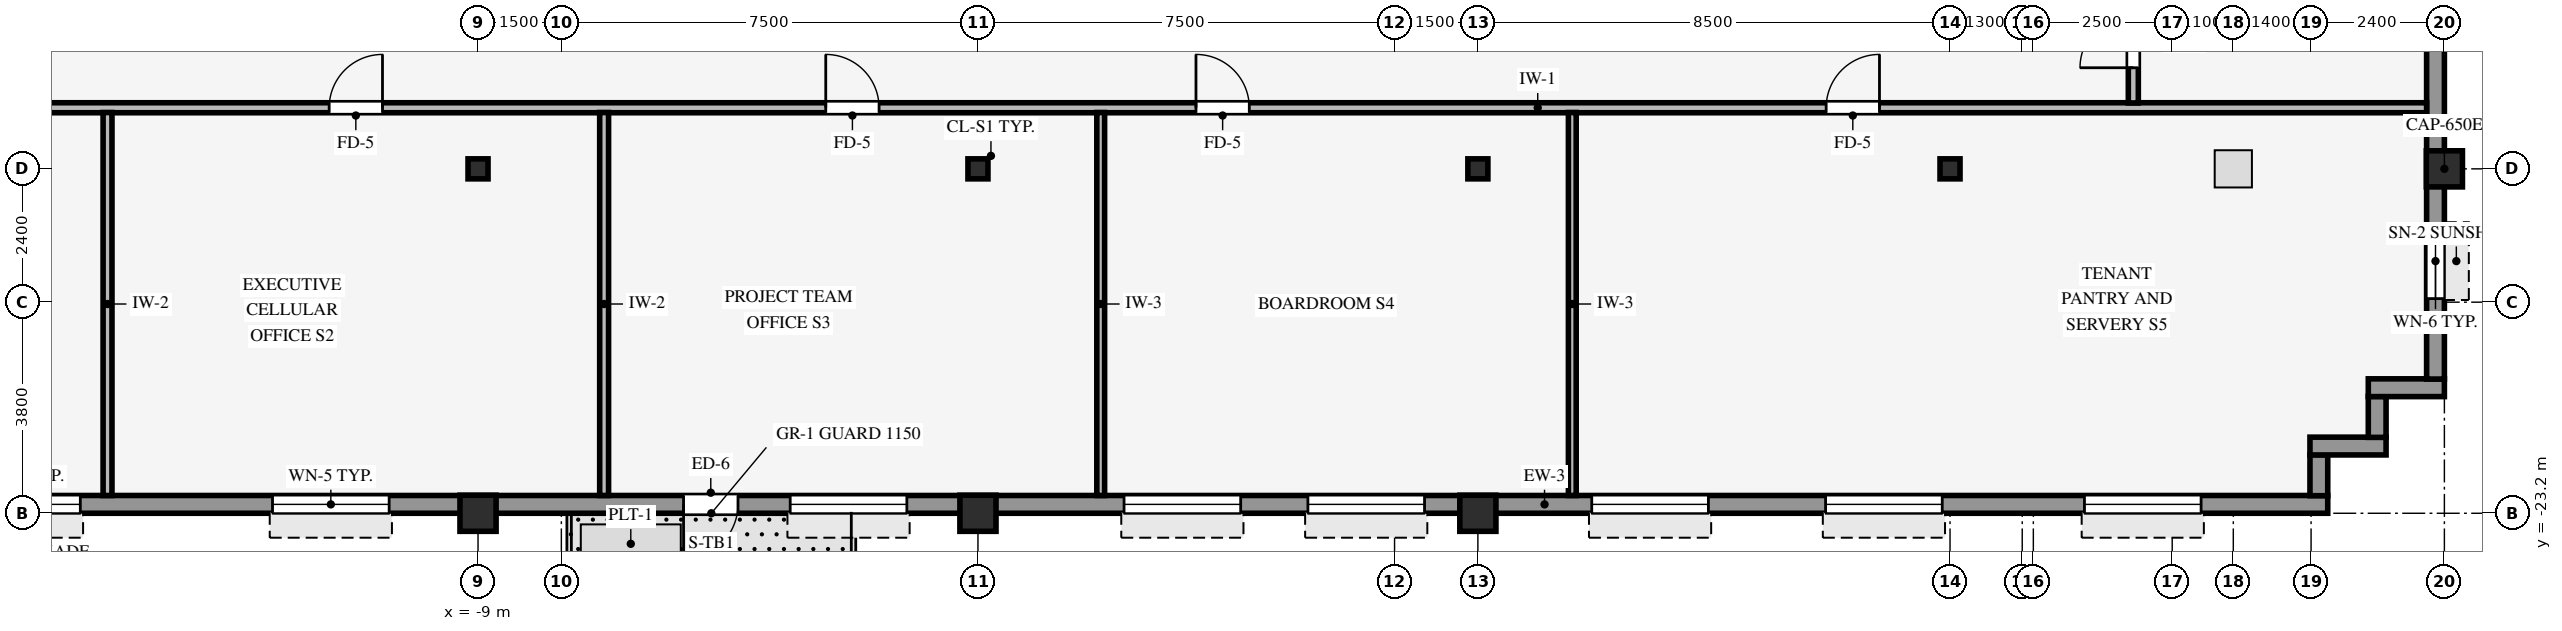
"""IFC4 building model, lengths in metres.
Left out: names, types, materials, properties, quantities, classifications, styles, units other than length and angle.
Written with IfcOpenShell. Run it as: python <this file> out.ifc"""

import sys

from ifc_helpers import new_model, si_unit, direction, frame, frame_2d, origin, origin_2d, place, context, subcontext, project, spatial, rectangle, hollow_rectangle, i_section, extrude, source, transform, mapped, element, fill, save


model = new_model("IFC4")
c1 = context("Model", 3, precision=1e-05, world=origin(), true_north=direction((0.0, 1.0)))
c2 = subcontext(c1, "Body", "Model", "MODEL_VIEW")
j1 = project(units=[si_unit("LENGTHUNIT", "METRE"), si_unit("PLANEANGLEUNIT", "RADIAN")], contexts=[c1])
p1 = place(None, origin())
s1 = spatial("IfcSite", under=j1, at=p1, CompositionType="ELEMENT")
p2 = place(p1, origin())
s2 = spatial("IfcBuilding", under=s1, at=p2, CompositionType="ELEMENT")
p3 = place(p2, frame((0.0, 0.0, 164.0)))
s3 = spatial("IfcBuildingStorey", under=s2, at=p3, CompositionType="ELEMENT", Elevation=164.0)
for number, where, z_axis, x_axis in (
    (1, (26.4, -17.0, 0.0), (0.0, 0.0, 1.0), (1.0, 0.0, 0.0)),
    (2, (-9.0, -23.2, 0.0), (0.0, 0.0, 1.0), (1.0, 0.0, 0.0)),
    (3, (0.0, -23.2, 0.0), (0.0, 0.0, 1.0), (1.0, 0.0, 0.0)),
    (4, (9.0, -23.2, 0.0), (0.0, 0.0, 1.0), (1.0, 0.0, 0.0)),
):
    element("IfcColumn", number, at=place(p3, frame(where, z_axis=z_axis, x_axis=x_axis)), inside=s3, PredefinedType="COLUMN", context=c2, shape_type="SweptSolid", body=[
        extrude(hollow_rectangle(XDim=0.65, YDim=0.65, WallThickness=0.04, InnerFilletRadius=0.04, OuterFilletRadius=0.08, at=origin_2d()), origin(), (0.0, 0.0, 1.0), 3.25),
    ])
for number, where, z_axis, x_axis in (
    (5, (0.0, -17.0, 0.0), (0.0, 0.0, 1.0), (1.0, 0.0, 0.0)),
    (6, (-9.0, -17.0, 0.0), (0.0, 0.0, 1.0), (1.0, 0.0, 0.0)),
    (7, (9.0, -17.0, 0.0), (0.0, 0.0, 1.0), (1.0, 0.0, 0.0)),
    (8, (17.5, -17.0, 0.0), (0.0, 0.0, 1.0), (1.0, 0.0, 0.0)),
):
    element("IfcColumn", number, at=place(p3, frame(where, z_axis=z_axis, x_axis=x_axis)), inside=s3, PredefinedType="COLUMN", context=c2, shape_type="SweptSolid", body=[
        extrude(i_section(OverallWidth=0.36, OverallDepth=0.36, WebThickness=0.021, FlangeThickness=0.021, FilletRadius=0.018, at=origin_2d()), origin(), (0.0, 0.0, 1.0), 3.25),
    ])
p4 = place(p3, frame((-24.3, -23.04, 0.0), z_axis=(0.0, 0.0, 1.0), x_axis=(1.0, 0.0, 0.0)))
e9 = element("IfcWall", 9, at=p4, inside=s3, PredefinedType="STANDARD", context=c2, shape_type="SweptSolid", body=[
    extrude(rectangle(XDim=48.6, YDim=0.32, at=frame_2d((24.3, 0.0))), origin(), (0.0, 0.0, 1.0), 2.585),
])
p5 = place(p4, frame((19.98, 0.0, 0.0), z_axis=(0.0, 0.0, 1.0), x_axis=(-1.0, 0.0, 0.0)))
e10 = element("IfcOpeningElement", 10, at=p5, cuts=e9, PredefinedType="OPENING", context=c2, shape_type="SweptSolid", body=[
    extrude(rectangle(XDim=0.98, YDim=2.15, at=frame_2d((0.49, 1.075))), frame((0.0, 0.17, 0.0), z_axis=(0.0, -1.0, 0.0), x_axis=(1.0, 0.0, 0.0)), (0.0, 0.0, 1.0), 0.34),
])
p6 = place(p4, frame((2.28, 0.0, 0.8)))
e11 = element("IfcOpeningElement", 11, at=p6, cuts=e9, PredefinedType="OPENING", context=c2, shape_type="SweptSolid", body=[
    extrude(rectangle(XDim=2.1, YDim=1.56, at=frame_2d((1.05, 0.78))), frame((0.0, 0.17, 0.0), z_axis=(0.0, -1.0, 0.0), x_axis=(1.0, 0.0, 0.0)), (0.0, 0.0, 1.0), 0.34),
])
p7 = place(p4, frame((6.04, 0.0, 0.8)))
e12 = element("IfcOpeningElement", 12, at=p7, cuts=e9, PredefinedType="OPENING", context=c2, shape_type="SweptSolid", body=[
    extrude(rectangle(XDim=2.1, YDim=1.56, at=frame_2d((1.05, 0.78))), frame((0.0, 0.17, 0.0), z_axis=(0.0, -1.0, 0.0), x_axis=(1.0, 0.0, 0.0)), (0.0, 0.0, 1.0), 0.34),
])
p8 = place(p4, frame((11.6, 0.0, 0.8)))
e13 = element("IfcOpeningElement", 13, at=p8, cuts=e9, PredefinedType="OPENING", context=c2, shape_type="SweptSolid", body=[
    extrude(rectangle(XDim=2.1, YDim=1.56, at=frame_2d((1.05, 0.78))), frame((0.0, 0.17, 0.0), z_axis=(0.0, -1.0, 0.0), x_axis=(1.0, 0.0, 0.0)), (0.0, 0.0, 1.0), 0.34),
])
p9 = place(p4, frame((20.92, 0.0, 0.8)))
e14 = element("IfcOpeningElement", 14, at=p9, cuts=e9, PredefinedType="OPENING", context=c2, shape_type="SweptSolid", body=[
    extrude(rectangle(XDim=2.1, YDim=1.56, at=frame_2d((1.05, 0.78))), frame((0.0, 0.17, 0.0), z_axis=(0.0, -1.0, 0.0), x_axis=(1.0, 0.0, 0.0)), (0.0, 0.0, 1.0), 0.34),
])
p10 = place(p4, frame((26.93, 0.0, 0.8)))
e15 = element("IfcOpeningElement", 15, at=p10, cuts=e9, PredefinedType="OPENING", context=c2, shape_type="SweptSolid", body=[
    extrude(rectangle(XDim=2.1, YDim=1.56, at=frame_2d((1.05, 0.78))), frame((0.0, 0.17, 0.0), z_axis=(0.0, -1.0, 0.0), x_axis=(1.0, 0.0, 0.0)), (0.0, 0.0, 1.0), 0.34),
])
p11 = place(p4, frame((30.24, 0.0, 0.8)))
e16 = element("IfcOpeningElement", 16, at=p11, cuts=e9, PredefinedType="OPENING", context=c2, shape_type="SweptSolid", body=[
    extrude(rectangle(XDim=2.1, YDim=1.56, at=frame_2d((1.05, 0.78))), frame((0.0, 0.17, 0.0), z_axis=(0.0, -1.0, 0.0), x_axis=(1.0, 0.0, 0.0)), (0.0, 0.0, 1.0), 0.34),
])
p12 = place(p4, frame((35.35, 0.0, 0.8)))
e17 = element("IfcOpeningElement", 17, at=p12, cuts=e9, PredefinedType="OPENING", context=c2, shape_type="SweptSolid", body=[
    extrude(rectangle(XDim=2.1, YDim=1.56, at=frame_2d((1.05, 0.78))), frame((0.0, 0.17, 0.0), z_axis=(0.0, -1.0, 0.0), x_axis=(1.0, 0.0, 0.0)), (0.0, 0.0, 1.0), 0.34),
])
p13 = place(p4, frame((39.56, 0.0, 0.8)))
e18 = element("IfcOpeningElement", 18, at=p13, cuts=e9, PredefinedType="OPENING", context=c2, shape_type="SweptSolid", body=[
    extrude(rectangle(XDim=2.1, YDim=1.56, at=frame_2d((1.05, 0.78))), frame((0.0, 0.17, 0.0), z_axis=(0.0, -1.0, 0.0), x_axis=(1.0, 0.0, 0.0)), (0.0, 0.0, 1.0), 0.34),
])
p14 = place(p4, frame((44.22, 0.0, 0.8)))
e19 = element("IfcOpeningElement", 19, at=p14, cuts=e9, PredefinedType="OPENING", context=c2, shape_type="SweptSolid", body=[
    extrude(rectangle(XDim=2.1, YDim=1.56, at=frame_2d((1.05, 0.78))), frame((0.0, 0.17, 0.0), z_axis=(0.0, -1.0, 0.0), x_axis=(1.0, 0.0, 0.0)), (0.0, 0.0, 1.0), 0.34),
])
p15 = place(p3, frame((24.14, -22.884, 0.0), z_axis=(0.0, 0.0, 1.0), x_axis=(0.0, 1.0, 0.0)))
e20 = element("IfcWall", 20, at=p15, inside=s3, PredefinedType="STANDARD", context=c2, shape_type="SweptSolid", body=[
    extrude(rectangle(XDim=0.738, YDim=0.32, at=frame_2d((0.369, 0.0))), origin(), (0.0, 0.0, 1.0), 3.24),
])
p16 = place(p3, frame((23.98, -21.99, 0.0), z_axis=(0.0, 0.0, 1.0), x_axis=(1.0, 0.0, 0.0)))
e21 = element("IfcWall", 21, at=p16, inside=s3, PredefinedType="STANDARD", context=c2, shape_type="SweptSolid", body=[
    extrude(rectangle(XDim=1.37, YDim=0.32, at=frame_2d((0.685, 0.0))), origin(), (0.0, 0.0, 1.0), 3.24),
])
p17 = place(p3, frame((25.19, -21.834, 0.0), z_axis=(0.0, 0.0, 1.0), x_axis=(0.0, 1.0, 0.0)))
e22 = element("IfcWall", 22, at=p17, inside=s3, PredefinedType="STANDARD", context=c2, shape_type="SweptSolid", body=[
    extrude(rectangle(XDim=0.738, YDim=0.32, at=frame_2d((0.369, 0.0))), origin(), (0.0, 0.0, 1.0), 3.24),
])
p18 = place(p3, frame((25.03, -20.94, 0.0), z_axis=(0.0, 0.0, 1.0), x_axis=(1.0, 0.0, 0.0)))
e23 = element("IfcWall", 23, at=p18, inside=s3, PredefinedType="STANDARD", context=c2, shape_type="SweptSolid", body=[
    extrude(rectangle(XDim=1.37, YDim=0.32, at=frame_2d((0.685, 0.0))), origin(), (0.0, 0.0, 1.0), 3.24),
])
p19 = place(p3, frame((26.24, -20.784, 0.0), z_axis=(0.0, 0.0, 1.0), x_axis=(0.0, 1.0, 0.0)))
e24 = element("IfcWall", 24, at=p19, inside=s3, PredefinedType="STANDARD", context=c2, shape_type="SweptSolid", body=[
    extrude(rectangle(XDim=41.568, YDim=0.32, at=frame_2d((20.784, 0.0))), origin(), (0.0, 0.0, 1.0), 3.24),
])
p20 = place(p19, frame((1.448, 0.0, 0.8)))
e25 = element("IfcOpeningElement", 25, at=p20, cuts=e24, PredefinedType="OPENING", context=c2, shape_type="SweptSolid", body=[
    extrude(rectangle(XDim=1.35, YDim=1.56, at=frame_2d((0.675, 0.78))), frame((0.0, 0.17, 0.0), z_axis=(0.0, -1.0, 0.0), x_axis=(1.0, 0.0, 0.0)), (0.0, 0.0, 1.0), 0.34),
])
p21 = place(p19, frame((7.744, 0.0, 0.8)))
e26 = element("IfcOpeningElement", 26, at=p21, cuts=e24, PredefinedType="OPENING", context=c2, shape_type="SweptSolid", body=[
    extrude(rectangle(XDim=1.35, YDim=1.56, at=frame_2d((0.675, 0.78))), frame((0.0, 0.17, 0.0), z_axis=(0.0, -1.0, 0.0), x_axis=(1.0, 0.0, 0.0)), (0.0, 0.0, 1.0), 0.34),
])
p22 = place(p19, frame((12.69, 0.0, 0.8)))
e27 = element("IfcOpeningElement", 27, at=p22, cuts=e24, PredefinedType="OPENING", context=c2, shape_type="SweptSolid", body=[
    extrude(rectangle(XDim=1.35, YDim=1.56, at=frame_2d((0.675, 0.78))), frame((0.0, 0.17, 0.0), z_axis=(0.0, -1.0, 0.0), x_axis=(1.0, 0.0, 0.0)), (0.0, 0.0, 1.0), 0.34),
])
p23 = place(p19, frame((17.636, 0.0, 0.8)))
e28 = element("IfcOpeningElement", 28, at=p23, cuts=e24, PredefinedType="OPENING", context=c2, shape_type="SweptSolid", body=[
    extrude(rectangle(XDim=1.35, YDim=1.56, at=frame_2d((0.675, 0.78))), frame((0.0, 0.17, 0.0), z_axis=(0.0, -1.0, 0.0), x_axis=(1.0, 0.0, 0.0)), (0.0, 0.0, 1.0), 0.34),
])
p24 = place(p19, frame((22.582, 0.0, 0.8)))
e29 = element("IfcOpeningElement", 29, at=p24, cuts=e24, PredefinedType="OPENING", context=c2, shape_type="SweptSolid", body=[
    extrude(rectangle(XDim=1.35, YDim=1.56, at=frame_2d((0.675, 0.78))), frame((0.0, 0.17, 0.0), z_axis=(0.0, -1.0, 0.0), x_axis=(1.0, 0.0, 0.0)), (0.0, 0.0, 1.0), 0.34),
])
p25 = place(p19, frame((27.528, 0.0, 0.8)))
e30 = element("IfcOpeningElement", 30, at=p25, cuts=e24, PredefinedType="OPENING", context=c2, shape_type="SweptSolid", body=[
    extrude(rectangle(XDim=1.35, YDim=1.56, at=frame_2d((0.675, 0.78))), frame((0.0, 0.17, 0.0), z_axis=(0.0, -1.0, 0.0), x_axis=(1.0, 0.0, 0.0)), (0.0, 0.0, 1.0), 0.34),
])
p26 = place(p19, frame((32.474, 0.0, 0.8)))
e31 = element("IfcOpeningElement", 31, at=p26, cuts=e24, PredefinedType="OPENING", context=c2, shape_type="SweptSolid", body=[
    extrude(rectangle(XDim=1.35, YDim=1.56, at=frame_2d((0.675, 0.78))), frame((0.0, 0.17, 0.0), z_axis=(0.0, -1.0, 0.0), x_axis=(1.0, 0.0, 0.0)), (0.0, 0.0, 1.0), 0.34),
])
p27 = place(p19, frame((38.77, 0.0, 0.8)))
e32 = element("IfcOpeningElement", 32, at=p27, cuts=e24, PredefinedType="OPENING", context=c2, shape_type="SweptSolid", body=[
    extrude(rectangle(XDim=1.35, YDim=1.56, at=frame_2d((0.675, 0.78))), frame((0.0, 0.17, 0.0), z_axis=(0.0, -1.0, 0.0), x_axis=(1.0, 0.0, 0.0)), (0.0, 0.0, 1.0), 0.34),
])
p28 = place(p3, frame((-26.08, -15.9, 0.0), z_axis=(0.0, 0.0, 1.0), x_axis=(1.0, 0.0, 0.0)))
e33 = element("IfcWall", 33, at=p28, inside=s3, PredefinedType="PARTITIONING", context=c2, shape_type="SweptSolid", body=[
    extrude(rectangle(XDim=52.16, YDim=0.18, at=frame_2d((26.08, 0.0))), origin(), (0.0, 0.0, 1.0), 3.24),
])
p29 = place(p28, frame((41.35, 0.0, 0.0)))
e34 = element("IfcOpeningElement", 34, at=p29, cuts=e33, PredefinedType="OPENING", context=c2, shape_type="SweptSolid", body=[
    extrude(rectangle(XDim=0.96, YDim=2.1, at=frame_2d((0.48, 1.05))), frame((0.0, 0.1, 0.0), z_axis=(0.0, -1.0, 0.0), x_axis=(1.0, 0.0, 0.0)), (0.0, 0.0, 1.0), 0.2),
])
p30 = place(p28, frame((23.34, 0.0, 0.0)))
e35 = element("IfcOpeningElement", 35, at=p30, cuts=e33, PredefinedType="OPENING", context=c2, shape_type="SweptSolid", body=[
    extrude(rectangle(XDim=0.96, YDim=2.1, at=frame_2d((0.48, 1.05))), frame((0.0, 0.1, 0.0), z_axis=(0.0, -1.0, 0.0), x_axis=(1.0, 0.0, 0.0)), (0.0, 0.0, 1.0), 0.2),
])
p31 = place(p28, frame((14.4, 0.0, 0.0)))
e36 = element("IfcOpeningElement", 36, at=p31, cuts=e33, PredefinedType="OPENING", context=c2, shape_type="SweptSolid", body=[
    extrude(rectangle(XDim=0.96, YDim=2.1, at=frame_2d((0.48, 1.05))), frame((0.0, 0.1, 0.0), z_axis=(0.0, -1.0, 0.0), x_axis=(1.0, 0.0, 0.0)), (0.0, 0.0, 1.0), 0.2),
])
p32 = place(p28, frame((30.005, 0.0, 0.0)))
e37 = element("IfcOpeningElement", 37, at=p32, cuts=e33, PredefinedType="OPENING", context=c2, shape_type="SweptSolid", body=[
    extrude(rectangle(XDim=0.96, YDim=2.1, at=frame_2d((0.48, 1.05))), frame((0.0, 0.1, 0.0), z_axis=(0.0, -1.0, 0.0), x_axis=(1.0, 0.0, 0.0)), (0.0, 0.0, 1.0), 0.2),
])
p33 = place(p28, frame((6.65, 0.0, 0.0)))
e38 = element("IfcOpeningElement", 38, at=p33, cuts=e33, PredefinedType="OPENING", context=c2, shape_type="SweptSolid", body=[
    extrude(rectangle(XDim=0.96, YDim=2.1, at=frame_2d((0.48, 1.05))), frame((0.0, 0.1, 0.0), z_axis=(0.0, -1.0, 0.0), x_axis=(1.0, 0.0, 0.0)), (0.0, 0.0, 1.0), 0.2),
])
for number, where, z_axis, x_axis in (
    (39, (-15.67, -22.88, 0.0), (0.0, 0.0, 1.0), (0.0, 1.0, 0.0)),
    (40, (-6.73, -22.88, 0.0), (0.0, 0.0, 1.0), (0.0, 1.0, 0.0)),
):
    element("IfcWall", number, at=place(p3, frame(where, z_axis=z_axis, x_axis=x_axis)), inside=s3, PredefinedType="PARTITIONING", context=c2, shape_type="SweptSolid", body=[
        extrude(rectangle(XDim=6.894, YDim=0.16, at=frame_2d((3.447, 0.0))), origin(), (0.0, 0.0, 1.0), 3.24),
    ])
for number, where, z_axis, x_axis in (
    (41, (2.21, -22.88, 0.0), (0.0, 0.0, 1.0), (0.0, 1.0, 0.0)),
    (42, (10.7, -22.88, 0.0), (0.0, 0.0, 1.0), (0.0, 1.0, 0.0)),
):
    element("IfcWall", number, at=place(p3, frame(where, z_axis=z_axis, x_axis=x_axis)), inside=s3, PredefinedType="PARTITIONING", context=c2, shape_type="SweptSolid", body=[
        extrude(rectangle(XDim=6.894, YDim=0.14, at=frame_2d((3.447, 0.0))), origin(), (0.0, 0.0, 1.0), 3.24),
    ])
p34 = place(p3, frame((20.8, -15.814, 0.0), z_axis=(0.0, 0.0, 1.0), x_axis=(0.0, 1.0, 0.0)))
e43 = element("IfcWall", 43, at=p34, inside=s3, PredefinedType="PARTITIONING", context=c2, shape_type="SweptSolid", body=[
    extrude(rectangle(XDim=2.228, YDim=0.18, at=frame_2d((1.114, 0.0))), origin(), (0.0, 0.0, 1.0), 3.24),
])
p35 = place(p34, frame((0.634, 0.0, 0.0)))
e44 = element("IfcOpeningElement", 44, at=p35, cuts=e43, PredefinedType="OPENING", context=c2, shape_type="SweptSolid", body=[
    extrude(rectangle(XDim=0.96, YDim=2.1, at=frame_2d((0.48, 1.05))), frame((0.0, 0.1, 0.0), z_axis=(0.0, -1.0, 0.0), x_axis=(1.0, 0.0, 0.0)), (0.0, 0.0, 1.0), 0.2),
])
m1 = source(origin(), c2, "Body", "SweptSolid", [
    extrude(rectangle(XDim=0.98, YDim=2.15, at=frame_2d((0.49, 1.075))), frame((0.0, 0.025, 0.0), z_axis=(0.0, -1.0, 0.0), x_axis=(1.0, 0.0, 0.0)), (0.0, 0.0, 1.0), 0.05),
])
p36 = place(p5, origin())
e45 = element("IfcDoor", 45, at=p36, inside=s3, OperationType="SINGLE_SWING_RIGHT", PredefinedType="DOOR", context=c2, shape_type="MappedRepresentation", body=[
    mapped(m1, transform((0.0, 0.0, 0.0), scale=1.0)),
])
fill(e10, e45)
m2 = source(origin(), c2, "Body", "SweptSolid", [
    extrude(rectangle(XDim=2.1, YDim=1.56, at=frame_2d((1.05, 0.78))), frame((0.0, 0.03, 0.0), z_axis=(0.0, -1.0, 0.0), x_axis=(1.0, 0.0, 0.0)), (0.0, 0.0, 1.0), 0.06),
])
p37 = place(p7, origin())
e46 = element("IfcWindow", 46, at=p37, inside=s3, PartitioningType="SINGLE_PANEL", PredefinedType="WINDOW", context=c2, shape_type="MappedRepresentation", body=[
    mapped(m2, transform((0.0, 0.0, 0.0), scale=1.0)),
])
fill(e12, e46)
p38 = place(p8, origin())
e47 = element("IfcWindow", 47, at=p38, inside=s3, PartitioningType="SINGLE_PANEL", PredefinedType="WINDOW", context=c2, shape_type="MappedRepresentation", body=[
    mapped(m2, transform((0.0, 0.0, 0.0), scale=1.0)),
])
fill(e13, e47)
p39 = place(p9, origin())
e48 = element("IfcWindow", 48, at=p39, inside=s3, PartitioningType="SINGLE_PANEL", PredefinedType="WINDOW", context=c2, shape_type="MappedRepresentation", body=[
    mapped(m2, transform((0.0, 0.0, 0.0), scale=1.0)),
])
fill(e14, e48)
p40 = place(p10, origin())
e49 = element("IfcWindow", 49, at=p40, inside=s3, PartitioningType="SINGLE_PANEL", PredefinedType="WINDOW", context=c2, shape_type="MappedRepresentation", body=[
    mapped(m2, transform((0.0, 0.0, 0.0), scale=1.0)),
])
fill(e15, e49)
p41 = place(p11, origin())
e50 = element("IfcWindow", 50, at=p41, inside=s3, PartitioningType="SINGLE_PANEL", PredefinedType="WINDOW", context=c2, shape_type="MappedRepresentation", body=[
    mapped(m2, transform((0.0, 0.0, 0.0), scale=1.0)),
])
fill(e16, e50)
p42 = place(p12, origin())
e51 = element("IfcWindow", 51, at=p42, inside=s3, PartitioningType="SINGLE_PANEL", PredefinedType="WINDOW", context=c2, shape_type="MappedRepresentation", body=[
    mapped(m2, transform((0.0, 0.0, 0.0), scale=1.0)),
])
fill(e17, e51)
p43 = place(p13, origin())
e52 = element("IfcWindow", 52, at=p43, inside=s3, PartitioningType="SINGLE_PANEL", PredefinedType="WINDOW", context=c2, shape_type="MappedRepresentation", body=[
    mapped(m2, transform((0.0, 0.0, 0.0), scale=1.0)),
])
fill(e18, e52)
p44 = place(p14, origin())
e53 = element("IfcWindow", 53, at=p44, inside=s3, PartitioningType="SINGLE_PANEL", PredefinedType="WINDOW", context=c2, shape_type="MappedRepresentation", body=[
    mapped(m2, transform((0.0, 0.0, 0.0), scale=1.0)),
])
fill(e19, e53)
m3 = source(origin(), c2, "Body", "SweptSolid", [
    extrude(rectangle(XDim=1.35, YDim=1.56, at=frame_2d((0.675, 0.78))), frame((0.0, 0.03, 0.0), z_axis=(0.0, -1.0, 0.0), x_axis=(1.0, 0.0, 0.0)), (0.0, 0.0, 1.0), 0.06),
])
p45 = place(p20, origin())
e54 = element("IfcWindow", 54, at=p45, inside=s3, PartitioningType="SINGLE_PANEL", PredefinedType="WINDOW", context=c2, shape_type="MappedRepresentation", body=[
    mapped(m3, transform((0.0, 0.0, 0.0), scale=1.0)),
])
fill(e25, e54)
m4 = source(origin(), c2, "Body", "SweptSolid", [
    extrude(rectangle(XDim=0.96, YDim=2.1, at=frame_2d((0.48, 1.05))), frame((0.0, 0.025, 0.0), z_axis=(0.0, -1.0, 0.0), x_axis=(1.0, 0.0, 0.0)), (0.0, 0.0, 1.0), 0.05),
])
p46 = place(p29, origin())
e55 = element("IfcDoor", 55, at=p46, inside=s3, OperationType="SINGLE_SWING_RIGHT", PredefinedType="DOOR", context=c2, shape_type="MappedRepresentation", body=[
    mapped(m4, transform((0.0, 0.0, 0.0), scale=1.0)),
])
fill(e34, e55)
p47 = place(p30, origin())
e56 = element("IfcDoor", 56, at=p47, inside=s3, OperationType="SINGLE_SWING_LEFT", PredefinedType="DOOR", context=c2, shape_type="MappedRepresentation", body=[
    mapped(m4, transform((0.0, 0.0, 0.0), scale=1.0)),
])
fill(e35, e56)
p48 = place(p31, origin())
e57 = element("IfcDoor", 57, at=p48, inside=s3, OperationType="SINGLE_SWING_RIGHT", PredefinedType="DOOR", context=c2, shape_type="MappedRepresentation", body=[
    mapped(m4, transform((0.0, 0.0, 0.0), scale=1.0)),
])
fill(e36, e57)
p49 = place(p32, origin())
e58 = element("IfcDoor", 58, at=p49, inside=s3, OperationType="SINGLE_SWING_LEFT", PredefinedType="DOOR", context=c2, shape_type="MappedRepresentation", body=[
    mapped(m4, transform((0.0, 0.0, 0.0), scale=1.0)),
])
fill(e37, e58)
p50 = place(p35, origin())
e59 = element("IfcDoor", 59, at=p50, inside=s3, OperationType="SINGLE_SWING_LEFT", PredefinedType="DOOR", context=c2, shape_type="MappedRepresentation", body=[
    mapped(m4, transform((0.0, 0.0, 0.0), scale=1.0)),
])
fill(e44, e59)
save(model, sys.argv[1])
